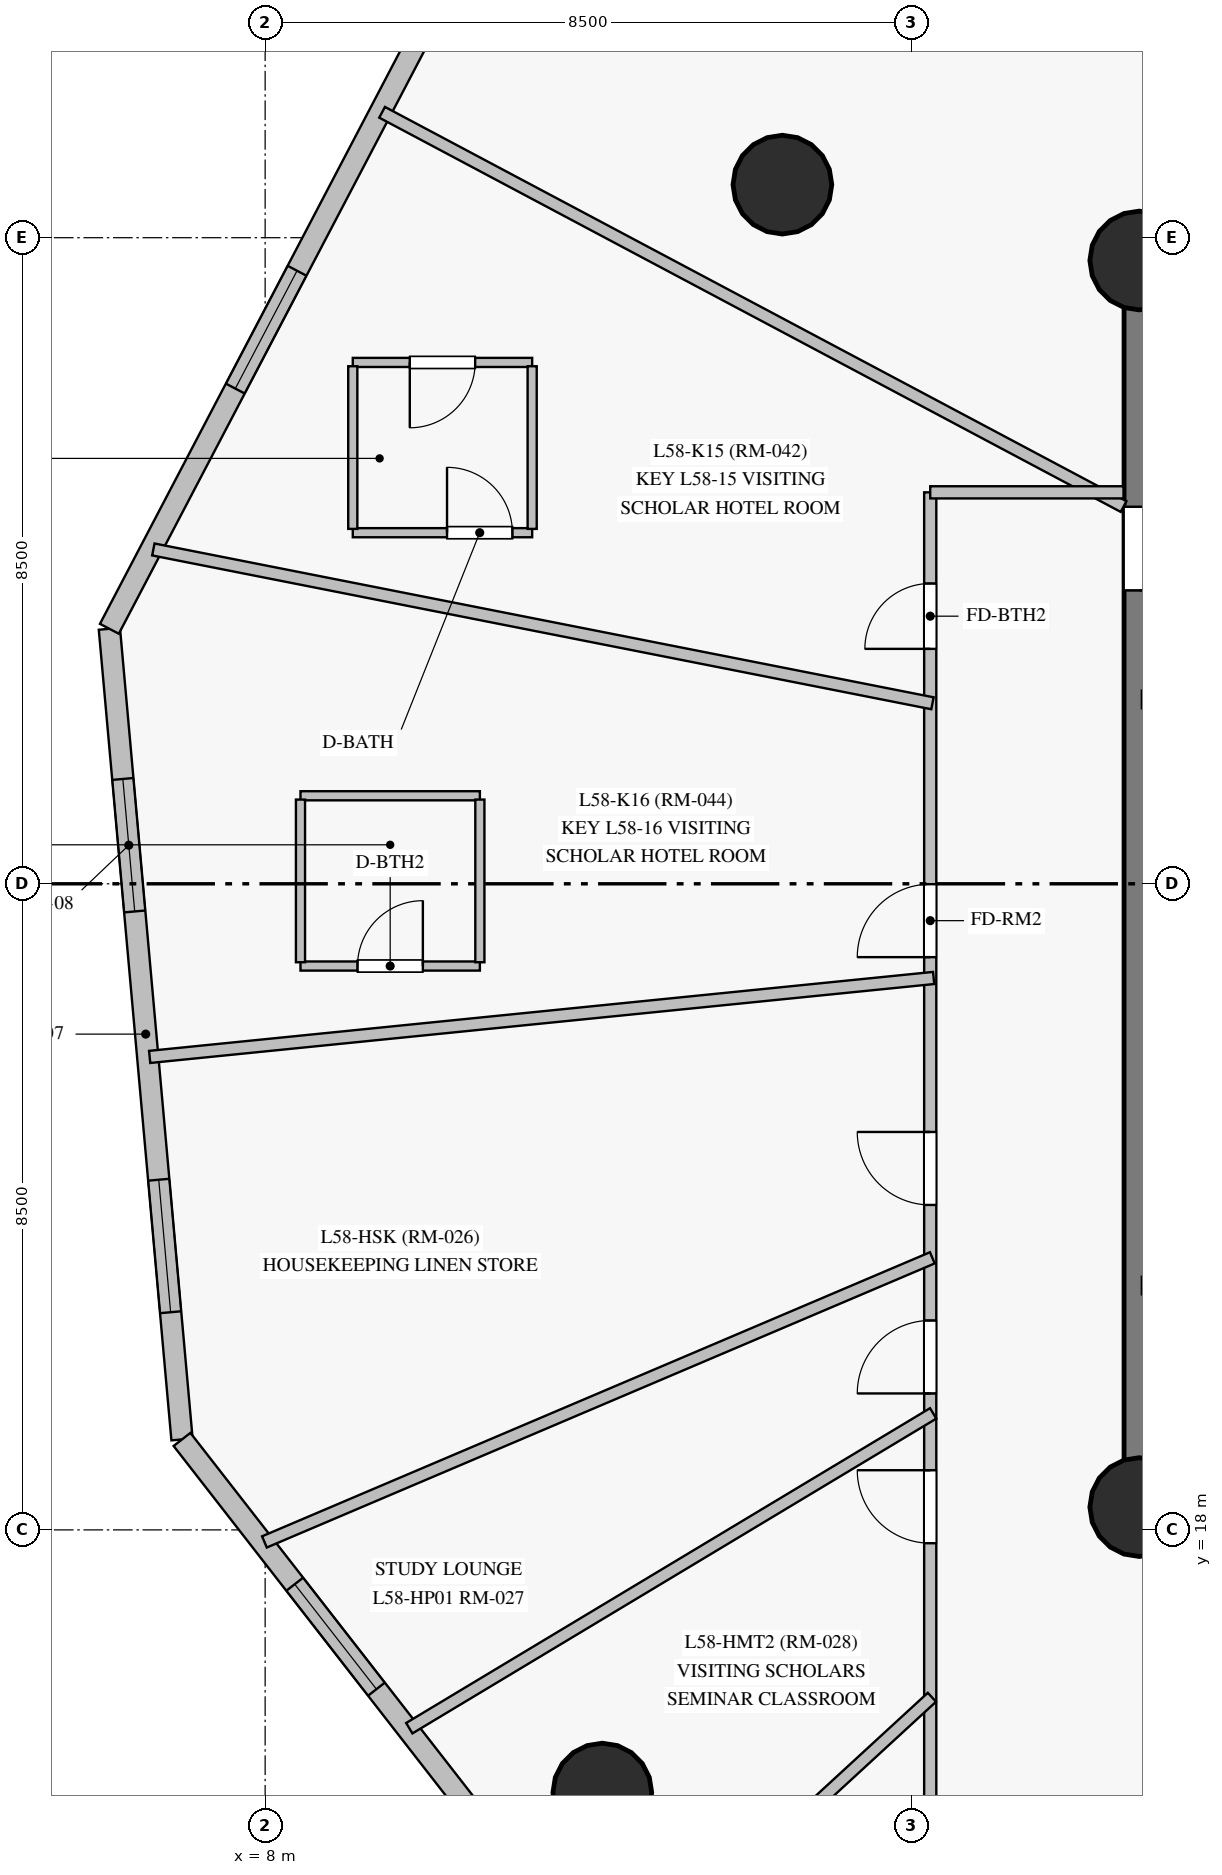
"""IFC4 building model, lengths in metres.
Left out: names, types, materials, properties, quantities, classifications, styles, units other than length and angle.
Written with IfcOpenShell. Run it as: python <this file> out.ifc"""

import sys

from ifc_helpers import new_model, si_unit, direction, frame, frame_2d, origin, origin_with_axes, origin_2d, place, context, subcontext, project, spatial, rectangle, circle, extrude, source, transform, mapped, element, fill, save


model = new_model("IFC4")
c1 = context("Model", 3, precision=1e-05, world=origin(), true_north=direction((0.0, 1.0)))
c2 = subcontext(c1, "Body", "Model", "MODEL_VIEW")
j1 = project(units=[si_unit("LENGTHUNIT", "METRE"), si_unit("PLANEANGLEUNIT", "RADIAN")], contexts=[c1])
p1 = place(None, origin())
s1 = spatial("IfcSite", under=j1, at=p1, CompositionType="ELEMENT")
p2 = place(p1, origin())
s2 = spatial("IfcBuilding", under=s1, at=p2, CompositionType="ELEMENT")
p3 = place(p2, frame((0.0, 0.0, 199.25)))
s3 = spatial("IfcBuildingStorey", under=s2, at=p3, CompositionType="ELEMENT", Elevation=199.25)
p4 = place(p3, frame((19.5, 18.3, 0.0), z_axis=(0.0, 0.0, 1.0), x_axis=(1.0, 0.0, 0.0)))
e1 = element("IfcWall", 1, at=p4, inside=s3, PredefinedType="SHEAR", context=c2, shape_type="SweptSolid", body=[
    extrude(rectangle(XDim=7.05, YDim=0.4, at=frame_2d((3.525, 0.0))), origin(), (0.0, 0.0, 1.0), 2.825),
])
p5 = place(p4, frame((4.2, 0.0, 0.0)))
e2 = element("IfcOpeningElement", 2, at=p5, cuts=e1, PredefinedType="OPENING", context=c2, shape_type="SweptSolid", body=[
    extrude(rectangle(XDim=1.4, YDim=2.2, at=frame_2d((0.7, 1.1))), frame((0.0, 0.21, 0.0), z_axis=(0.0, -1.0, 0.0), x_axis=(1.0, 0.0, 0.0)), (0.0, 0.0, 1.0), 0.42),
])
p6 = place(p3, frame((26.55, 34.7, 0.0), z_axis=(0.0, 0.0, 1.0), x_axis=(-1.0, 0.0, 0.0)))
e3 = element("IfcWall", 3, at=p6, inside=s3, PredefinedType="SHEAR", context=c2, shape_type="SweptSolid", body=[
    extrude(rectangle(XDim=7.05, YDim=0.4, at=frame_2d((3.525, 0.0))), origin(), (0.0, 0.0, 1.0), 2.825),
])
p7 = place(p3, frame((19.5, 34.7, 0.0), z_axis=(0.0, 0.0, 1.0), x_axis=(0.0, -1.0, 0.0)))
e4 = element("IfcWall", 4, at=p7, inside=s3, PredefinedType="SHEAR", context=c2, shape_type="SweptSolid", body=[
    extrude(rectangle(XDim=16.4, YDim=0.4, at=frame_2d((8.2, 0.0))), origin(), (0.0, 0.0, 1.0), 2.825),
])
p8 = place(p7, frame((3.24, 0.0, 0.0)))
e5 = element("IfcOpeningElement", 5, at=p8, cuts=e4, PredefinedType="OPENING", context=c2, shape_type="SweptSolid", body=[
    extrude(rectangle(XDim=1.1, YDim=2.15, at=frame_2d((0.55, 1.075))), frame((0.0, 0.21, 0.0), z_axis=(0.0, -1.0, 0.0), x_axis=(1.0, 0.0, 0.0)), (0.0, 0.0, 1.0), 0.42),
])
m1 = source(origin_with_axes(), c2, "Body", "SweptSolid", [
    extrude(circle(Radius=0.65, at=origin_2d()), origin(), (0.0, 0.0, 1.0), 3.05),
])
for number, where, z_axis, x_axis in (
    (6, (19.5, 18.3, 0.0), (0.0, 0.0, 1.0), (1.0, 0.0, 0.0)),
    (7, (19.5, 34.7, 0.0), (0.0, 0.0, 1.0), (1.0, 0.0, 0.0)),
    (8, (14.805, 35.698, 0.0), (0.0, 0.0, 1.0), (1.0, 0.0, 0.0)),
    (9, (12.436, 14.544, 0.0), (0.0, 0.0, 1.0), (1.0, 0.0, 0.0)),
):
    element("IfcColumn", number, at=place(p3, frame(where, z_axis=z_axis, x_axis=x_axis)), inside=s3, PredefinedType="COLUMN", context=c2, shape_type="MappedRepresentation", body=[
        mapped(m1, transform((0.0, 0.0, 0.0), scale=1.0)),
    ])
p9 = place(p3, frame((5.951, 29.855, 0.0), z_axis=(0.0, 0.0, 1.0), x_axis=(0.08926720843, -0.996007713574, 0.0)))
e10 = element("IfcWall", 10, at=p9, inside=s3, PredefinedType="SOLIDWALL", context=c2, shape_type="SweptSolid", body=[
    extrude(rectangle(XDim=10.707, YDim=0.28, at=frame_2d((5.354, 0.0))), origin(), (0.0, 0.0, 1.0), 2.825),
])
p10 = place(p9, frame((1.983, 0.0, 0.85)))
e11 = element("IfcOpeningElement", 11, at=p10, cuts=e10, PredefinedType="OPENING", context=c2, shape_type="SweptSolid", body=[
    extrude(rectangle(XDim=1.75, YDim=1.65, at=frame_2d((0.875, 0.825))), frame((0.0, 0.15, 0.0), z_axis=(0.0, -1.0, 0.0), x_axis=(1.0, 0.0, 0.0)), (0.0, 0.0, 1.0), 0.3),
])
p11 = place(p9, frame((7.277, 0.0, 0.85)))
e12 = element("IfcOpeningElement", 12, at=p11, cuts=e10, PredefinedType="OPENING", context=c2, shape_type="SweptSolid", body=[
    extrude(rectangle(XDim=1.75, YDim=1.65, at=frame_2d((0.875, 0.825))), frame((0.0, 0.15, 0.0), z_axis=(0.0, -1.0, 0.0), x_axis=(1.0, 0.0, 0.0)), (0.0, 0.0, 1.0), 0.3),
])
p12 = place(p3, frame((6.906, 19.19, 0.0), z_axis=(0.0, 0.0, 1.0), x_axis=(0.614303780549, -0.789069619997, 0.0)))
e13 = element("IfcWall", 13, at=p12, inside=s3, PredefinedType="SOLIDWALL", context=c2, shape_type="SweptSolid", body=[
    extrude(rectangle(XDim=13.82, YDim=0.28, at=frame_2d((6.91, 0.0))), origin(), (0.0, 0.0, 1.0), 2.825),
])
p13 = place(p12, frame((2.414, 0.0, 0.85)))
e14 = element("IfcOpeningElement", 14, at=p13, cuts=e13, PredefinedType="OPENING", context=c2, shape_type="SweptSolid", body=[
    extrude(rectangle(XDim=1.75, YDim=1.65, at=frame_2d((0.875, 0.825))), frame((0.0, 0.15, 0.0), z_axis=(0.0, -1.0, 0.0), x_axis=(1.0, 0.0, 0.0)), (0.0, 0.0, 1.0), 0.3),
])
p14 = place(p12, frame((6.145, 0.0, 0.85)))
e15 = element("IfcOpeningElement", 15, at=p14, cuts=e13, PredefinedType="OPENING", context=c2, shape_type="SweptSolid", body=[
    extrude(rectangle(XDim=1.75, YDim=1.65, at=frame_2d((0.875, 0.825))), frame((0.0, 0.15, 0.0), z_axis=(0.0, -1.0, 0.0), x_axis=(1.0, 0.0, 0.0)), (0.0, 0.0, 1.0), 0.3),
])
p15 = place(p12, frame((10.605, 0.0, 0.85)))
e16 = element("IfcOpeningElement", 16, at=p15, cuts=e13, PredefinedType="OPENING", context=c2, shape_type="SweptSolid", body=[
    extrude(rectangle(XDim=1.75, YDim=1.65, at=frame_2d((0.875, 0.825))), frame((0.0, 0.15, 0.0), z_axis=(0.0, -1.0, 0.0), x_axis=(1.0, 0.0, 0.0)), (0.0, 0.0, 1.0), 0.3),
])
p16 = place(p3, frame((12.367, 42.095, 0.0), z_axis=(0.0, 0.0, 1.0), x_axis=(-0.464253195627, -0.885702529267, 0.0)))
e17 = element("IfcWall", 17, at=p16, inside=s3, PredefinedType="SOLIDWALL", context=c2, shape_type="SweptSolid", body=[
    extrude(rectangle(XDim=13.82, YDim=0.28, at=frame_2d((6.91, 0.0))), origin(), (0.0, 0.0, 1.0), 2.825),
])
p17 = place(p16, frame((2.223, 0.0, 0.85)))
e18 = element("IfcOpeningElement", 18, at=p17, cuts=e17, PredefinedType="OPENING", context=c2, shape_type="SweptSolid", body=[
    extrude(rectangle(XDim=1.75, YDim=1.65, at=frame_2d((0.875, 0.825))), frame((0.0, 0.15, 0.0), z_axis=(0.0, -1.0, 0.0), x_axis=(1.0, 0.0, 0.0)), (0.0, 0.0, 1.0), 0.3),
])
p18 = place(p16, frame((8.502, 0.0, 0.85)))
e19 = element("IfcOpeningElement", 19, at=p18, cuts=e17, PredefinedType="OPENING", context=c2, shape_type="SweptSolid", body=[
    extrude(rectangle(XDim=1.75, YDim=1.65, at=frame_2d((0.875, 0.825))), frame((0.0, 0.15, 0.0), z_axis=(0.0, -1.0, 0.0), x_axis=(1.0, 0.0, 0.0)), (0.0, 0.0, 1.0), 0.3),
])
p19 = place(p3, frame((16.75, 13.85, 0.0), z_axis=(0.0, 0.0, 1.0), x_axis=(0.0, 1.0, 0.0)))
e20 = element("IfcWall", 20, at=p19, inside=s3, PredefinedType="PARTITIONING", context=c2, shape_type="SweptSolid", body=[
    extrude(rectangle(XDim=17.8, YDim=0.16, at=frame_2d((8.9, 0.0))), origin(), (0.0, 0.0, 1.0), 2.375),
])
p20 = place(p19, frame((11.685, 0.0, 0.0)))
e21 = element("IfcOpeningElement", 21, at=p20, cuts=e20, PredefinedType="OPENING", context=c2, shape_type="SweptSolid", body=[
    extrude(rectangle(XDim=0.96, YDim=2.15, at=frame_2d((0.48, 1.075))), frame((0.0, 0.09, 0.0), z_axis=(0.0, -1.0, 0.0), x_axis=(1.0, 0.0, 0.0)), (0.0, 0.0, 1.0), 0.18),
])
p21 = place(p19, frame((8.425, 0.0, 0.0)))
e22 = element("IfcOpeningElement", 22, at=p21, cuts=e20, PredefinedType="OPENING", context=c2, shape_type="SweptSolid", body=[
    extrude(rectangle(XDim=0.96, YDim=2.15, at=frame_2d((0.48, 1.075))), frame((0.0, 0.09, 0.0), z_axis=(0.0, -1.0, 0.0), x_axis=(1.0, 0.0, 0.0)), (0.0, 0.0, 1.0), 0.18),
])
p22 = place(p19, frame((5.945, 0.0, 0.0)))
e23 = element("IfcOpeningElement", 23, at=p22, cuts=e20, PredefinedType="OPENING", context=c2, shape_type="SweptSolid", body=[
    extrude(rectangle(XDim=0.96, YDim=2.15, at=frame_2d((0.48, 1.075))), frame((0.0, 0.09, 0.0), z_axis=(0.0, -1.0, 0.0), x_axis=(1.0, 0.0, 0.0)), (0.0, 0.0, 1.0), 0.18),
])
p23 = place(p19, frame((3.975, 0.0, 0.0)))
e24 = element("IfcOpeningElement", 24, at=p23, cuts=e20, PredefinedType="OPENING", context=c2, shape_type="SweptSolid", body=[
    extrude(rectangle(XDim=0.96, YDim=2.15, at=frame_2d((0.48, 1.075))), frame((0.0, 0.09, 0.0), z_axis=(0.0, -1.0, 0.0), x_axis=(1.0, 0.0, 0.0)), (0.0, 0.0, 1.0), 0.18),
])
p24 = place(p19, frame((15.741, 0.0, 0.0)))
e25 = element("IfcOpeningElement", 25, at=p24, cuts=e20, PredefinedType="OPENING", context=c2, shape_type="SweptSolid", body=[
    extrude(rectangle(XDim=0.86, YDim=2.04, at=frame_2d((0.43, 1.02))), frame((0.0, 0.09, 0.0), z_axis=(0.0, -1.0, 0.0), x_axis=(1.0, 0.0, 0.0)), (0.0, 0.0, 1.0), 0.18),
])
p25 = place(p3, frame((19.294, 31.463, 0.0), z_axis=(0.0, 0.0, 1.0), x_axis=(-0.88295229879, 0.46946271211, 0.0)))
e26 = element("IfcWall", 26, at=p25, inside=s3, PredefinedType="PARTITIONING", context=c2, shape_type="SweptSolid", body=[
    extrude(rectangle(XDim=11.048, YDim=0.16, at=frame_2d((5.524, 0.0))), origin(), (0.0, 0.0, 1.0), 2.825),
])
p26 = place(p3, frame((16.779, 28.875, 0.0), z_axis=(0.0, 0.0, 1.0), x_axis=(-0.981067427603, 0.193666472311, 0.0)))
e27 = element("IfcWall", 27, at=p26, inside=s3, PredefinedType="PARTITIONING", context=c2, shape_type="SweptSolid", body=[
    extrude(rectangle(XDim=10.448, YDim=0.16, at=frame_2d((5.224, 0.0))), origin(), (0.0, 0.0, 1.0), 2.825),
])
p27 = place(p3, frame((6.481, 24.222, 0.0), z_axis=(0.0, 0.0, 1.0), x_axis=(0.994968633779, 0.100186914292, 0.0)))
e28 = element("IfcWall", 28, at=p27, inside=s3, PredefinedType="PARTITIONING", context=c2, shape_type="SweptSolid", body=[
    extrude(rectangle(XDim=10.366, YDim=0.16, at=frame_2d((5.183, 0.0))), origin(), (0.0, 0.0, 1.0), 2.825),
])
p28 = place(p3, frame((16.778, 21.579, 0.0), z_axis=(0.0, 0.0, 1.0), x_axis=(-0.920225962441, -0.391387503697, 0.0)))
e29 = element("IfcWall", 29, at=p28, inside=s3, PredefinedType="PARTITIONING", context=c2, shape_type="SweptSolid", body=[
    extrude(rectangle(XDim=9.549, YDim=0.16, at=frame_2d((4.774, 0.0))), origin(), (0.0, 0.0, 1.0), 2.825),
])
p29 = place(p3, frame((16.789, 19.532, 0.0), z_axis=(0.0, 0.0, 1.0), x_axis=(-0.857152504072, -0.515062699836, 0.0)))
e30 = element("IfcWall", 30, at=p29, inside=s3, PredefinedType="PARTITIONING", context=c2, shape_type="SweptSolid", body=[
    extrude(rectangle(XDim=8.041, YDim=0.16, at=frame_2d((4.021, 0.0))), origin(), (0.0, 0.0, 1.0), 2.825),
])
p30 = place(p3, frame((16.772, 15.798, 0.0), z_axis=(0.0, 0.0, 1.0), x_axis=(-0.736130064202, -0.676840105621, 0.0)))
e31 = element("IfcWall", 31, at=p30, inside=s3, PredefinedType="PARTITIONING", context=c2, shape_type="SweptSolid", body=[
    extrude(rectangle(XDim=5.695, YDim=0.16, at=frame_2d((2.847, 0.0))), origin(), (0.0, 0.0, 1.0), 2.825),
])
p31 = place(p3, frame((16.75, 31.65, 0.0), z_axis=(0.0, 0.0, 1.0), x_axis=(1.0, 0.0, 0.0)))
e32 = element("IfcWall", 32, at=p31, inside=s3, PredefinedType="PARTITIONING", context=c2, shape_type="SweptSolid", body=[
    extrude(rectangle(XDim=2.543, YDim=0.16, at=frame_2d((1.271, 0.0))), origin(), (0.0, 0.0, 1.0), 2.825),
])
p32 = place(p3, frame((9.153, 31.119, 0.0), z_axis=(0.0, 0.0, 1.0), x_axis=(1.0, 0.0, 0.0)))
e33 = element("IfcWall", 33, at=p32, inside=s3, PredefinedType="PARTITIONING", context=c2, shape_type="SweptSolid", body=[
    extrude(rectangle(XDim=2.36, YDim=0.12, at=frame_2d((1.18, 0.0))), origin(), (0.0, 0.0, 1.0), 2.825),
])
p33 = place(p32, frame((1.24, 0.0, 0.0)))
e34 = element("IfcOpeningElement", 34, at=p33, cuts=e33, PredefinedType="OPENING", context=c2, shape_type="SweptSolid", body=[
    extrude(rectangle(XDim=0.86, YDim=2.1, at=frame_2d((0.43, 1.05))), frame((0.0, 0.07, 0.0), z_axis=(0.0, -1.0, 0.0), x_axis=(1.0, 0.0, 0.0)), (0.0, 0.0, 1.0), 0.14),
])
p34 = place(p3, frame((11.513, 33.359, 0.0), z_axis=(0.0, 0.0, 1.0), x_axis=(-1.0, 0.0, 0.0)))
e35 = element("IfcWall", 35, at=p34, inside=s3, PredefinedType="PARTITIONING", context=c2, shape_type="SweptSolid", body=[
    extrude(rectangle(XDim=2.36, YDim=0.12, at=frame_2d((1.18, 0.0))), origin(), (0.0, 0.0, 1.0), 2.825),
])
p35 = place(p34, frame((0.75, 0.0, 0.0)))
e36 = element("IfcOpeningElement", 36, at=p35, cuts=e35, PredefinedType="OPENING", context=c2, shape_type="SweptSolid", body=[
    extrude(rectangle(XDim=0.86, YDim=2.04, at=frame_2d((0.43, 1.02))), frame((0.0, 0.07, 0.0), z_axis=(0.0, -1.0, 0.0), x_axis=(1.0, 0.0, 0.0)), (0.0, 0.0, 1.0), 0.14),
])
p36 = place(p3, frame((8.465, 25.418, 0.0), z_axis=(0.0, 0.0, 1.0), x_axis=(1.0, 0.0, 0.0)))
e37 = element("IfcWall", 37, at=p36, inside=s3, PredefinedType="PARTITIONING", context=c2, shape_type="SweptSolid", body=[
    extrude(rectangle(XDim=2.36, YDim=0.12, at=frame_2d((1.18, 0.0))), origin(), (0.0, 0.0, 1.0), 2.825),
])
p37 = place(p36, frame((0.75, 0.0, 0.0)))
e38 = element("IfcOpeningElement", 38, at=p37, cuts=e37, PredefinedType="OPENING", context=c2, shape_type="SweptSolid", body=[
    extrude(rectangle(XDim=0.86, YDim=2.04, at=frame_2d((0.43, 1.02))), frame((0.0, 0.07, 0.0), z_axis=(0.0, -1.0, 0.0), x_axis=(1.0, 0.0, 0.0)), (0.0, 0.0, 1.0), 0.14),
])
p38 = place(p3, frame((10.825, 27.658, 0.0), z_axis=(0.0, 0.0, 1.0), x_axis=(-1.0, 0.0, 0.0)))
e39 = element("IfcWall", 39, at=p38, inside=s3, PredefinedType="PARTITIONING", context=c2, shape_type="SweptSolid", body=[
    extrude(rectangle(XDim=2.36, YDim=0.12, at=frame_2d((1.18, 0.0))), origin(), (0.0, 0.0, 1.0), 2.825),
])
for number, where, z_axis, x_axis in (
    (40, (10.825, 25.468, 0.0), (0.0, 0.0, 1.0), (0.0, 1.0, 0.0)),
    (41, (8.465, 27.608, 0.0), (0.0, 0.0, 1.0), (0.0, -1.0, 0.0)),
):
    element("IfcWall", number, at=place(p3, frame(where, z_axis=z_axis, x_axis=x_axis)), inside=s3, PredefinedType="PARTITIONING", context=c2, shape_type="SweptSolid", body=[
        extrude(rectangle(XDim=2.14, YDim=0.12, at=frame_2d((1.07, 0.0))), origin(), (0.0, 0.0, 1.0), 2.825),
    ])
for number, where, z_axis, x_axis in (
    (42, (11.513, 31.169, 0.0), (0.0, 0.0, 1.0), (0.0, 1.0, 0.0)),
    (43, (9.153, 33.309, 0.0), (0.0, 0.0, 1.0), (0.0, -1.0, 0.0)),
):
    element("IfcWall", number, at=place(p3, frame(where, z_axis=z_axis, x_axis=x_axis)), inside=s3, PredefinedType="PARTITIONING", context=c2, shape_type="SweptSolid", body=[
        extrude(rectangle(XDim=2.14, YDim=0.12, at=frame_2d((1.07, 0.0))), origin(), (0.0, 0.0, 1.0), 2.825),
    ])
m2 = source(origin_with_axes(), c2, "Body", "SweptSolid", [
    extrude(rectangle(XDim=1.75, YDim=1.65, at=frame_2d((0.875, 0.825))), frame((0.0, 0.03, 0.0), z_axis=(0.0, -1.0, 0.0), x_axis=(1.0, 0.0, 0.0)), (0.0, 0.0, 1.0), 0.06),
])
p39 = place(p10, origin())
e44 = element("IfcWindow", 44, at=p39, inside=s3, PartitioningType="SINGLE_PANEL", PredefinedType="WINDOW", context=c2, shape_type="MappedRepresentation", body=[
    mapped(m2, transform((0.0, 0.0, 0.0), scale=1.0)),
])
fill(e11, e44)
p40 = place(p11, origin())
e45 = element("IfcWindow", 45, at=p40, inside=s3, PartitioningType="SINGLE_PANEL", PredefinedType="WINDOW", context=c2, shape_type="MappedRepresentation", body=[
    mapped(m2, transform((0.0, 0.0, 0.0), scale=1.0)),
])
fill(e12, e45)
p41 = place(p13, origin())
e46 = element("IfcWindow", 46, at=p41, inside=s3, PartitioningType="SINGLE_PANEL", PredefinedType="WINDOW", context=c2, shape_type="MappedRepresentation", body=[
    mapped(m2, transform((0.0, 0.0, 0.0), scale=1.0)),
])
fill(e14, e46)
p42 = place(p18, origin())
e47 = element("IfcWindow", 47, at=p42, inside=s3, PartitioningType="SINGLE_PANEL", PredefinedType="WINDOW", context=c2, shape_type="MappedRepresentation", body=[
    mapped(m2, transform((0.0, 0.0, 0.0), scale=1.0)),
])
fill(e19, e47)
m3 = source(origin_with_axes(), c2, "Body", "SweptSolid", [
    extrude(rectangle(XDim=1.1, YDim=2.15, at=frame_2d((0.55, 1.075))), frame((0.0, 0.025, 0.0), z_axis=(0.0, -1.0, 0.0), x_axis=(1.0, 0.0, 0.0)), (0.0, 0.0, 1.0), 0.05),
])
p43 = place(p8, origin())
e48 = element("IfcDoor", 48, at=p43, inside=s3, OperationType="SINGLE_SWING_RIGHT", PredefinedType="DOOR", context=c2, shape_type="MappedRepresentation", body=[
    mapped(m3, transform((0.0, 0.0, 0.0), scale=1.0)),
])
fill(e5, e48)
m4 = source(origin_with_axes(), c2, "Body", "SweptSolid", [
    extrude(rectangle(XDim=0.86, YDim=2.1, at=frame_2d((0.43, 1.05))), frame((0.0, 0.025, 0.0), z_axis=(0.0, -1.0, 0.0), x_axis=(1.0, 0.0, 0.0)), (0.0, 0.0, 1.0), 0.05),
])
p44 = place(p33, origin())
e49 = element("IfcDoor", 49, at=p44, inside=s3, OperationType="SINGLE_SWING_LEFT", PredefinedType="DOOR", context=c2, shape_type="MappedRepresentation", body=[
    mapped(m4, transform((0.0, 0.0, 0.0), scale=1.0)),
])
fill(e34, e49)
m5 = source(origin_with_axes(), c2, "Body", "SweptSolid", [
    extrude(rectangle(XDim=0.86, YDim=2.04, at=frame_2d((0.43, 1.02))), frame((0.0, 0.025, 0.0), z_axis=(0.0, -1.0, 0.0), x_axis=(1.0, 0.0, 0.0)), (0.0, 0.0, 1.0), 0.05),
])
p45 = place(p37, origin())
e50 = element("IfcDoor", 50, at=p45, inside=s3, OperationType="SINGLE_SWING_RIGHT", PredefinedType="DOOR", context=c2, shape_type="MappedRepresentation", body=[
    mapped(m5, transform((0.0, 0.0, 0.0), scale=1.0)),
])
fill(e38, e50)
m6 = source(origin_with_axes(), c2, "Body", "SweptSolid", [
    extrude(rectangle(XDim=0.96, YDim=2.15, at=frame_2d((0.48, 1.075))), frame((0.0, 0.025, 0.0), z_axis=(0.0, -1.0, 0.0), x_axis=(1.0, 0.0, 0.0)), (0.0, 0.0, 1.0), 0.05),
])
p46 = place(p20, origin())
e51 = element("IfcDoor", 51, at=p46, inside=s3, OperationType="SINGLE_SWING_LEFT", PredefinedType="DOOR", context=c2, shape_type="MappedRepresentation", body=[
    mapped(m6, transform((0.0, 0.0, 0.0), scale=1.0)),
])
fill(e21, e51)
p47 = place(p21, origin())
e52 = element("IfcDoor", 52, at=p47, inside=s3, OperationType="SINGLE_SWING_RIGHT", PredefinedType="DOOR", context=c2, shape_type="MappedRepresentation", body=[
    mapped(m6, transform((0.0, 0.0, 0.0), scale=1.0)),
])
fill(e22, e52)
p48 = place(p22, origin())
e53 = element("IfcDoor", 53, at=p48, inside=s3, OperationType="SINGLE_SWING_LEFT", PredefinedType="DOOR", context=c2, shape_type="MappedRepresentation", body=[
    mapped(m6, transform((0.0, 0.0, 0.0), scale=1.0)),
])
fill(e23, e53)
p49 = place(p23, origin())
e54 = element("IfcDoor", 54, at=p49, inside=s3, OperationType="SINGLE_SWING_RIGHT", PredefinedType="DOOR", context=c2, shape_type="MappedRepresentation", body=[
    mapped(m6, transform((0.0, 0.0, 0.0), scale=1.0)),
])
fill(e24, e54)
p50 = place(p24, origin())
e55 = element("IfcDoor", 55, at=p50, inside=s3, OperationType="SINGLE_SWING_LEFT", PredefinedType="DOOR", context=c2, shape_type="MappedRepresentation", body=[
    mapped(m5, transform((0.0, 0.0, 0.0), scale=1.0)),
])
fill(e25, e55)
p51 = place(p35, origin())
e56 = element("IfcDoor", 56, at=p51, inside=s3, OperationType="SINGLE_SWING_RIGHT", PredefinedType="DOOR", context=c2, shape_type="MappedRepresentation", body=[
    mapped(m5, transform((0.0, 0.0, 0.0), scale=1.0)),
])
fill(e36, e56)
save(model, sys.argv[1])
